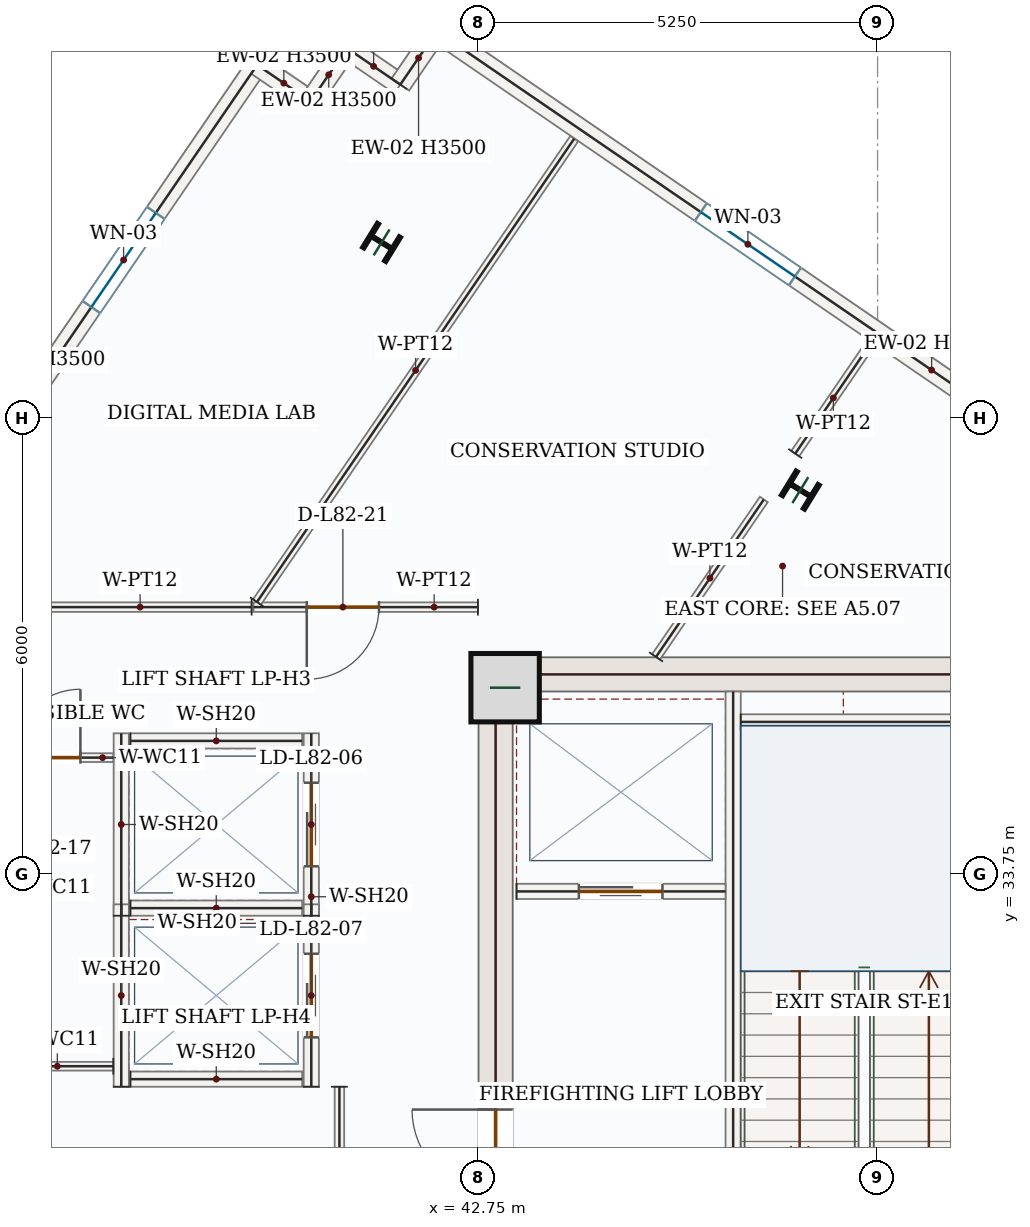
"""IFC4 building model, lengths in metres.
Left out: names, types, materials, properties, quantities, classifications, styles, units other than length and angle.
Written with IfcOpenShell. Run it as: python <this file> out.ifc"""

import sys

from ifc_helpers import new_model, si_unit, direction, frame, frame_2d, origin, origin_2d, place, context, subcontext, project, spatial, rectangle, i_section, extrude, source, transform, mapped, element, fill, save


model = new_model("IFC4")
c1 = context("Model", 3, precision=1e-05, world=origin(), true_north=direction((0.0, 1.0)))
c2 = subcontext(c1, "Body", "Model", "MODEL_VIEW")
j1 = project(units=[si_unit("LENGTHUNIT", "METRE"), si_unit("PLANEANGLEUNIT", "RADIAN")], contexts=[c1])
p1 = place(None, origin())
s1 = spatial("IfcSite", under=j1, at=p1, CompositionType="ELEMENT")
p2 = place(p1, origin())
s2 = spatial("IfcBuilding", under=s1, at=p2, CompositionType="ELEMENT")
p3 = place(p2, frame((0.0, 0.0, 338.55)))
s3 = spatial("IfcBuildingStorey", under=s2, at=p3, CompositionType="ELEMENT", Elevation=338.55)
p4 = place(p3, frame((42.975, 28.05, 0.0), z_axis=(0.0, 0.0, 1.0), x_axis=(0.0, 1.0, 0.0)))
e1 = element("IfcWall", 1, at=p4, inside=s3, PredefinedType="SHEAR", context=c2, shape_type="SweptSolid", body=[
    extrude(rectangle(XDim=8.55, YDim=0.45, at=frame_2d((4.275, 0.0))), origin(), (0.0, 0.0, 1.0), 3.5),
])
p5 = place(p4, frame((1.5, 0.0, 0.0)))
e2 = element("IfcOpeningElement", 2, at=p5, cuts=e1, PredefinedType="OPENING", context=c2, shape_type="SweptSolid", body=[
    extrude(rectangle(XDim=1.1, YDim=2.2, at=frame_2d((0.55, 1.1))), frame((0.0, 0.235, 0.0), z_axis=(0.0, -1.0, 0.0), x_axis=(1.0, 0.0, 0.0)), (0.0, 0.0, 1.0), 0.47),
])
m1 = source(origin(), c2, "Body", "SweptSolid", [
    extrude(rectangle(XDim=7.1, YDim=0.45, at=frame_2d((3.55, 0.0))), origin(), (0.0, 0.0, 1.0), 3.5),
])
p6 = place(p3, frame((43.2, 36.375, 0.0), z_axis=(0.0, 0.0, 1.0), x_axis=(1.0, 0.0, 0.0)))
e3 = element("IfcWall", 3, at=p6, inside=s3, PredefinedType="SHEAR", context=c2, shape_type="MappedRepresentation", body=[
    mapped(m1, transform((0.0, 0.0, 0.0), x_axis=(1.0, 0.0, 0.0), y_axis=(0.0, 1.0, 0.0), z_axis=(0.0, 0.0, 1.0), scale=1.0)),
])
m2 = source(origin(), c2, "Body", "SweptSolid", [
    extrude(rectangle(XDim=0.9, YDim=0.9, at=origin_2d()), origin(), (0.0, 0.0, 1.0), 3.75),
])
p7 = place(p3, frame((43.1, 36.2, 0.0), z_axis=(0.0, 0.0, 1.0), x_axis=(1.0, 0.0, 0.0)))
e4 = element("IfcColumn", 4, at=p7, inside=s3, PredefinedType="COLUMN", context=c2, shape_type="MappedRepresentation", body=[
    mapped(m2, transform((0.0, 0.0, 0.0), x_axis=(1.0, 0.0, 0.0), y_axis=(0.0, 1.0, 0.0), z_axis=(0.0, 0.0, 1.0), scale=1.0)),
])
m3 = source(origin(), c2, "Body", "SweptSolid", [
    extrude(i_section(OverallWidth=0.369, OverallDepth=0.356, WebThickness=0.011, FlangeThickness=0.018, FilletRadius=0.018, at=origin_2d()), origin(), (0.0, 0.0, 1.0), 3.75),
])
for number, where, z_axis, x_axis in (
    (5, (46.984, 38.8, 0.0), (0.0, 0.0, 1.0), (0.522, 0.853, 0.0)),
    (6, (41.475, 42.058, 0.0), (0.0, 0.0, 1.0), (0.522, 0.853, 0.0)),
):
    element("IfcColumn", number, at=place(p3, frame(where, z_axis=z_axis, x_axis=x_axis)), inside=s3, PredefinedType="COLUMN", context=c2, shape_type="MappedRepresentation", body=[
        mapped(m3, transform((0.0, 0.0, 0.0), x_axis=(1.0, 0.0, 0.0), y_axis=(0.0, 1.0, 0.0), z_axis=(0.0, 0.0, 1.0), scale=1.0)),
    ])
p8 = place(p3, frame((36.323, 39.26, 0.0), z_axis=(0.0, 0.0, 1.0), x_axis=(0.564953982519, 0.825122413728, 0.0)))
e7 = element("IfcWall", 7, at=p8, inside=s3, PredefinedType="SOLIDWALL", context=c2, shape_type="SweptSolid", body=[
    extrude(rectangle(XDim=6.221, YDim=0.28, at=frame_2d((3.111, 0.0))), origin(), (0.0, 0.0, 1.0), 3.5),
])
p9 = place(p8, frame((2.361, 0.0, 0.85)))
e8 = element("IfcOpeningElement", 8, at=p9, cuts=e7, PredefinedType="OPENING", context=c2, shape_type="SweptSolid", body=[
    extrude(rectangle(XDim=1.5, YDim=1.5, at=frame_2d((0.75, 0.75))), frame((0.0, 0.15, 0.0), z_axis=(0.0, -1.0, 0.0), x_axis=(1.0, 0.0, 0.0)), (0.0, 0.0, 1.0), 0.3),
])
m4 = source(origin(), c2, "Body", "SweptSolid", [
    extrude(rectangle(XDim=0.85, YDim=0.28, at=frame_2d((0.425, 0.0))), origin(), (0.0, 0.0, 1.0), 3.5),
])
for number, where, z_axis, x_axis in (
    (9, (39.838, 44.394, 0.0), (0.0, 0.0, 1.0), (0.825, -0.565, 0.0)),
    (10, (40.539, 43.913, 0.0), (0.0, 0.0, 1.0), (0.565, 0.825, 0.0)),
    (11, (41.02, 44.615, 0.0), (0.0, 0.0, 1.0), (0.825, -0.565, 0.0)),
):
    element("IfcWall", number, at=place(p3, frame(where, z_axis=z_axis, x_axis=x_axis)), inside=s3, PredefinedType="SOLIDWALL", context=c2, shape_type="MappedRepresentation", body=[
        mapped(m4, transform((0.0, 0.0, 0.0), x_axis=(1.0, 0.0, 0.0), y_axis=(0.0, 1.0, 0.0), z_axis=(0.0, 0.0, 1.0), scale=1.0)),
    ])
m5 = source(origin(), c2, "Body", "SweptSolid", [
    extrude(rectangle(XDim=0.85, YDim=0.28, at=frame_2d((0.425, 0.0))), origin(), (0.0, 0.0, 1.0), 3.5),
])
p10 = place(p3, frame((41.721, 44.135, 0.0), z_axis=(0.0, 0.0, 1.0), x_axis=(0.565064897913, 0.825046459993, 0.0)))
e12 = element("IfcWall", 12, at=p10, inside=s3, PredefinedType="SOLIDWALL", context=c2, shape_type="MappedRepresentation", body=[
    mapped(m5, transform((0.0, 0.0, 0.0), x_axis=(1.0, 0.0, 0.0), y_axis=(0.0, 1.0, 0.0), z_axis=(0.0, 0.0, 1.0), scale=1.0)),
])
p11 = place(p3, frame((42.201, 44.836, 0.0), z_axis=(0.0, 0.0, 1.0), x_axis=(0.825121888295, -0.56495474992, 0.0)))
e13 = element("IfcWall", 13, at=p11, inside=s3, PredefinedType="SOLIDWALL", context=c2, shape_type="SweptSolid", body=[
    extrude(rectangle(XDim=9.92, YDim=0.28, at=frame_2d((4.96, 0.0))), origin(), (0.0, 0.0, 1.0), 3.5),
])
p12 = place(p11, frame((4.21, 0.0, 0.85)))
e14 = element("IfcOpeningElement", 14, at=p12, cuts=e13, PredefinedType="OPENING", context=c2, shape_type="SweptSolid", body=[
    extrude(rectangle(XDim=1.5, YDim=1.5, at=frame_2d((0.75, 0.75))), frame((0.0, 0.15, 0.0), z_axis=(0.0, -1.0, 0.0), x_axis=(1.0, 0.0, 0.0)), (0.0, 0.0, 1.0), 0.3),
])
p13 = place(p3, frame((46.1, 28.15, 0.0), z_axis=(0.0, 0.0, 1.0), x_axis=(0.0, 1.0, 0.0)))
e15 = element("IfcWall", 15, at=p13, inside=s3, PredefinedType="SOLIDWALL", context=c2, shape_type="SweptSolid", body=[
    extrude(rectangle(XDim=8.0, YDim=0.2, at=frame_2d((4.0, 0.0))), origin(), (0.0, 0.0, 1.0), 3.5),
])
p14 = place(p13, frame((0.4, 0.0, 0.0)))
e16 = element("IfcOpeningElement", 16, at=p14, cuts=e15, PredefinedType="OPENING", context=c2, shape_type="SweptSolid", body=[
    extrude(rectangle(XDim=1.05, YDim=2.15, at=frame_2d((0.525, 1.075))), frame((0.0, 0.11, 0.0), z_axis=(0.0, -1.0, 0.0), x_axis=(1.0, 0.0, 0.0)), (0.0, 0.0, 1.0), 0.22),
])
m6 = source(origin(), c2, "Body", "SweptSolid", [
    extrude(rectangle(XDim=3.25, YDim=0.2, at=frame_2d((1.625, 0.0))), origin(), (0.0, 0.0, 1.0), 3.5),
])
p15 = place(p3, frame((46.2, 35.75, 0.0), z_axis=(0.0, 0.0, 1.0), x_axis=(1.0, 0.0, 0.0)))
e17 = element("IfcWall", 17, at=p15, inside=s3, PredefinedType="SOLIDWALL", context=c2, shape_type="MappedRepresentation", body=[
    mapped(m6, transform((0.0, 0.0, 0.0), x_axis=(1.0, 0.0, 0.0), y_axis=(0.0, 1.0, 0.0), z_axis=(0.0, 0.0, 1.0), scale=1.0)),
])
p16 = place(p3, frame((43.25, 33.52, 0.0), z_axis=(0.0, 0.0, 1.0), x_axis=(1.0, 0.0, 0.0)))
e18 = element("IfcWall", 18, at=p16, inside=s3, PredefinedType="SOLIDWALL", context=c2, shape_type="SweptSolid", body=[
    extrude(rectangle(XDim=2.75, YDim=0.2, at=frame_2d((1.375, 0.0))), origin(), (0.0, 0.0, 1.0), 3.5),
])
p17 = place(p16, frame((0.82, 0.0, 0.0)))
e19 = element("IfcOpeningElement", 19, at=p17, cuts=e18, PredefinedType="OPENING", context=c2, shape_type="SweptSolid", body=[
    extrude(rectangle(XDim=1.1, YDim=2.15, at=frame_2d((0.55, 1.075))), frame((0.0, 0.11, 0.0), z_axis=(0.0, -1.0, 0.0), x_axis=(1.0, 0.0, 0.0)), (0.0, 0.0, 1.0), 0.22),
])
m7 = source(origin(), c2, "Body", "SweptSolid", [
    extrude(rectangle(XDim=2.4, YDim=0.2, at=frame_2d((1.2, 0.0))), origin(), (0.0, 0.0, 1.0), 3.5),
])
p18 = place(p3, frame((38.05, 33.2, 0.0), z_axis=(0.0, 0.0, 1.0), x_axis=(0.0, 1.0, 0.0)))
e20 = element("IfcWall", 20, at=p18, inside=s3, PredefinedType="SOLIDWALL", context=c2, shape_type="MappedRepresentation", body=[
    mapped(m7, transform((0.0, 0.0, 0.0), x_axis=(1.0, 0.0, 0.0), y_axis=(0.0, 1.0, 0.0), z_axis=(0.0, 0.0, 1.0), scale=1.0)),
])
p19 = place(p3, frame((40.55, 33.2, 0.0), z_axis=(0.0, 0.0, 1.0), x_axis=(0.0, 1.0, 0.0)))
e21 = element("IfcWall", 21, at=p19, inside=s3, PredefinedType="SOLIDWALL", context=c2, shape_type="SweptSolid", body=[
    extrude(rectangle(XDim=2.4, YDim=0.2, at=frame_2d((1.2, 0.0))), origin(), (0.0, 0.0, 1.0), 3.5),
])
p20 = place(p19, frame((0.65, 0.0, 0.0)))
e22 = element("IfcOpeningElement", 22, at=p20, cuts=e21, PredefinedType="OPENING", context=c2, shape_type="SweptSolid", body=[
    extrude(rectangle(XDim=1.1, YDim=2.15, at=frame_2d((0.55, 1.075))), frame((0.0, 0.11, 0.0), z_axis=(0.0, -1.0, 0.0), x_axis=(1.0, 0.0, 0.0)), (0.0, 0.0, 1.0), 0.22),
])
m8 = source(origin(), c2, "Body", "SweptSolid", [
    extrude(rectangle(XDim=2.26, YDim=0.2, at=frame_2d((1.13, 0.0))), origin(), (0.0, 0.0, 1.0), 3.5),
])
for number, where, z_axis, x_axis in (
    (23, (38.17, 33.3, 0.0), (0.0, 0.0, 1.0), (1.0, 0.0, 0.0)),
    (24, (38.17, 35.5, 0.0), (0.0, 0.0, 1.0), (1.0, 0.0, 0.0)),
):
    element("IfcWall", number, at=place(p3, frame(where, z_axis=z_axis, x_axis=x_axis)), inside=s3, PredefinedType="SOLIDWALL", context=c2, shape_type="MappedRepresentation", body=[
        mapped(m8, transform((0.0, 0.0, 0.0), x_axis=(1.0, 0.0, 0.0), y_axis=(0.0, 1.0, 0.0), z_axis=(0.0, 0.0, 1.0), scale=1.0)),
    ])
p21 = place(p3, frame((38.05, 30.95, 0.0), z_axis=(0.0, 0.0, 1.0), x_axis=(0.0, 1.0, 0.0)))
e25 = element("IfcWall", 25, at=p21, inside=s3, PredefinedType="SOLIDWALL", context=c2, shape_type="MappedRepresentation", body=[
    mapped(m7, transform((0.0, 0.0, 0.0), x_axis=(1.0, 0.0, 0.0), y_axis=(0.0, 1.0, 0.0), z_axis=(0.0, 0.0, 1.0), scale=1.0)),
])
p22 = place(p3, frame((40.55, 30.95, 0.0), z_axis=(0.0, 0.0, 1.0), x_axis=(0.0, 1.0, 0.0)))
e26 = element("IfcWall", 26, at=p22, inside=s3, PredefinedType="SOLIDWALL", context=c2, shape_type="SweptSolid", body=[
    extrude(rectangle(XDim=2.4, YDim=0.2, at=frame_2d((1.2, 0.0))), origin(), (0.0, 0.0, 1.0), 3.5),
])
p23 = place(p22, frame((0.65, 0.0, 0.0)))
e27 = element("IfcOpeningElement", 27, at=p23, cuts=e26, PredefinedType="OPENING", context=c2, shape_type="SweptSolid", body=[
    extrude(rectangle(XDim=1.1, YDim=2.15, at=frame_2d((0.55, 1.075))), frame((0.0, 0.11, 0.0), z_axis=(0.0, -1.0, 0.0), x_axis=(1.0, 0.0, 0.0)), (0.0, 0.0, 1.0), 0.22),
])
p24 = place(p3, frame((38.17, 31.05, 0.0), z_axis=(0.0, 0.0, 1.0), x_axis=(1.0, 0.0, 0.0)))
e28 = element("IfcWall", 28, at=p24, inside=s3, PredefinedType="SOLIDWALL", context=c2, shape_type="MappedRepresentation", body=[
    mapped(m8, transform((0.0, 0.0, 0.0), x_axis=(1.0, 0.0, 0.0), y_axis=(0.0, 1.0, 0.0), z_axis=(0.0, 0.0, 1.0), scale=1.0)),
])
m9 = source(origin(), c2, "Body", "SweptSolid", [
    extrude(rectangle(XDim=1.473, YDim=0.115, at=frame_2d((0.736, 0.0))), origin(), (0.0, 0.0, 1.0), 3.5),
])
p25 = place(p3, frame((37.945, 31.22, 0.0), z_axis=(0.0, 0.0, 1.0), x_axis=(-1.0, 0.0, 0.0)))
e29 = element("IfcWall", 29, at=p25, inside=s3, PredefinedType="PARTITIONING", context=c2, shape_type="MappedRepresentation", body=[
    mapped(m9, transform((0.0, 0.0, 0.0), x_axis=(1.0, 0.0, 0.0), y_axis=(0.0, 1.0, 0.0), z_axis=(0.0, 0.0, 1.0), scale=1.0)),
])
p26 = place(p3, frame((36.472, 35.28, 0.0), z_axis=(0.0, 0.0, 1.0), x_axis=(1.0, 0.0, 0.0)))
e30 = element("IfcWall", 30, at=p26, inside=s3, PredefinedType="PARTITIONING", context=c2, shape_type="SweptSolid", body=[
    extrude(rectangle(XDim=1.473, YDim=0.115, at=frame_2d((0.736, 0.0))), origin(), (0.0, 0.0, 1.0), 3.5),
])
p27 = place(p26, frame((0.14, 0.0, 0.0)))
e31 = element("IfcOpeningElement", 31, at=p27, cuts=e30, PredefinedType="OPENING", context=c2, shape_type="SweptSolid", body=[
    extrude(rectangle(XDim=0.9, YDim=2.1, at=frame_2d((0.45, 1.05))), frame((0.0, 0.067, 0.0), z_axis=(0.0, -1.0, 0.0), x_axis=(1.0, 0.0, 0.0)), (0.0, 0.0, 1.0), 0.135),
])
m10 = source(origin(), c2, "Body", "SweptSolid", [
    extrude(rectangle(XDim=3.01, YDim=0.125, at=frame_2d((1.505, 0.0))), origin(), (0.0, 0.0, 1.0), 3.5),
])
p28 = place(p3, frame((40.92, 30.95, 0.0), z_axis=(0.0, 0.0, 1.0), x_axis=(0.0, -1.0, 0.0)))
e32 = element("IfcWall", 32, at=p28, inside=s3, PredefinedType="PARTITIONING", context=c2, shape_type="MappedRepresentation", body=[
    mapped(m10, transform((0.0, 0.0, 0.0), x_axis=(1.0, 0.0, 0.0), y_axis=(0.0, 1.0, 0.0), z_axis=(0.0, 0.0, 1.0), scale=1.0)),
])
m11 = source(origin(), c2, "Body", "SweptSolid", [
    extrude(rectangle(XDim=2.511, YDim=0.125, at=frame_2d((1.255, 0.0))), origin(), (0.0, 0.0, 1.0), 3.5),
])
p29 = place(p3, frame((45.085, 36.605, 0.0), z_axis=(0.0, 0.0, 1.0), x_axis=(0.564980194272, 0.825104466162, 0.0)))
e33 = element("IfcWall", 33, at=p29, inside=s3, PredefinedType="PARTITIONING", context=c2, shape_type="MappedRepresentation", body=[
    mapped(m11, transform((0.0, 0.0, 0.0), x_axis=(1.0, 0.0, 0.0), y_axis=(0.0, 1.0, 0.0), z_axis=(0.0, 0.0, 1.0), scale=1.0)),
])
m12 = source(origin(), c2, "Body", "SweptSolid", [
    extrude(rectangle(XDim=1.775, YDim=0.125, at=frame_2d((0.888, 0.0))), origin(), (0.0, 0.0, 1.0), 3.5),
])
p30 = place(p3, frame((46.917, 39.28, 0.0), z_axis=(0.0, 0.0, 1.0), x_axis=(0.56509798207, 0.825023800057, 0.0)))
e34 = element("IfcWall", 34, at=p30, inside=s3, PredefinedType="PARTITIONING", context=c2, shape_type="MappedRepresentation", body=[
    mapped(m12, transform((0.0, 0.0, 0.0), x_axis=(1.0, 0.0, 0.0), y_axis=(0.0, 1.0, 0.0), z_axis=(0.0, 0.0, 1.0), scale=1.0)),
])
p31 = place(p3, frame((42.742, 37.26, 0.0), z_axis=(0.0, 0.0, 1.0), x_axis=(-0.999999996583, 8.2671957e-05, 0.0)))
e35 = element("IfcWall", 35, at=p31, inside=s3, PredefinedType="PARTITIONING", context=c2, shape_type="SweptSolid", body=[
    extrude(rectangle(XDim=2.953, YDim=0.125, at=frame_2d((1.477, 0.0))), origin(), (0.0, 0.0, 1.0), 3.5),
])
p32 = place(p31, frame((1.302, 0.0, 0.0)))
e36 = element("IfcOpeningElement", 36, at=p32, cuts=e35, PredefinedType="OPENING", context=c2, shape_type="SweptSolid", body=[
    extrude(rectangle(XDim=0.95, YDim=2.15, at=frame_2d((0.475, 1.075))), frame((0.0, 0.073, 0.0), z_axis=(0.0, -1.0, 0.0), x_axis=(1.0, 0.0, 0.0)), (0.0, 0.0, 1.0), 0.145),
])
m13 = source(origin(), c2, "Body", "SweptSolid", [
    extrude(rectangle(XDim=7.387, YDim=0.125, at=frame_2d((3.693, 0.0))), origin(), (0.0, 0.0, 1.0), 3.5),
])
p33 = place(p3, frame((39.835, 37.327, 0.0), z_axis=(0.0, 0.0, 1.0), x_axis=(0.564969427755, 0.8251118383, 0.0)))
e37 = element("IfcWall", 37, at=p33, inside=s3, PredefinedType="PARTITIONING", context=c2, shape_type="MappedRepresentation", body=[
    mapped(m13, transform((0.0, 0.0, 0.0), x_axis=(1.0, 0.0, 0.0), y_axis=(0.0, 1.0, 0.0), z_axis=(0.0, 0.0, 1.0), scale=1.0)),
])
p34 = place(p3, frame((39.765, 37.26, 0.0), z_axis=(0.0, 0.0, 1.0), x_axis=(-1.0, 0.0, 0.0)))
e38 = element("IfcWall", 38, at=p34, inside=s3, PredefinedType="PARTITIONING", context=c2, shape_type="SweptSolid", body=[
    extrude(rectangle(XDim=5.696, YDim=0.125, at=frame_2d((2.848, 0.0))), origin(), (0.0, 0.0, 1.0), 3.5),
])
p35 = place(p34, frame((3.085, 0.0, 0.0)))
e39 = element("IfcOpeningElement", 39, at=p35, cuts=e38, PredefinedType="OPENING", context=c2, shape_type="SweptSolid", body=[
    extrude(rectangle(XDim=0.95, YDim=2.15, at=frame_2d((0.475, 1.075))), frame((0.0, 0.073, 0.0), z_axis=(0.0, -1.0, 0.0), x_axis=(1.0, 0.0, 0.0)), (0.0, 0.0, 1.0), 0.145),
])
m14 = source(origin(), c2, "Body", "SweptSolid", [
    extrude(rectangle(XDim=1.5, YDim=1.5, at=frame_2d((0.75, 0.75))), frame((0.0, 0.03, 0.0), z_axis=(0.0, -1.0, 0.0), x_axis=(1.0, 0.0, 0.0)), (0.0, 0.0, 1.0), 0.06),
])
p36 = place(p9, origin())
e40 = element("IfcWindow", 40, at=p36, inside=s3, PartitioningType="SINGLE_PANEL", PredefinedType="WINDOW", context=c2, shape_type="MappedRepresentation", body=[
    mapped(m14, transform((0.0, 0.0, 0.0), x_axis=(1.0, 0.0, 0.0), y_axis=(0.0, 1.0, 0.0), z_axis=(0.0, 0.0, 1.0), scale=1.0)),
])
fill(e8, e40)
p37 = place(p12, origin())
e41 = element("IfcWindow", 41, at=p37, inside=s3, PartitioningType="SINGLE_PANEL", PredefinedType="WINDOW", context=c2, shape_type="MappedRepresentation", body=[
    mapped(m14, transform((0.0, 0.0, 0.0), x_axis=(1.0, 0.0, 0.0), y_axis=(0.0, 1.0, 0.0), z_axis=(0.0, 0.0, 1.0), scale=1.0)),
])
fill(e14, e41)
m15 = source(origin(), c2, "Body", "SweptSolid", [
    extrude(rectangle(XDim=1.1, YDim=2.15, at=frame_2d((0.55, 1.075))), frame((0.0, 0.025, 0.0), z_axis=(0.0, -1.0, 0.0), x_axis=(1.0, 0.0, 0.0)), (0.0, 0.0, 1.0), 0.05),
])
p38 = place(p17, origin())
e42 = element("IfcDoor", 42, at=p38, inside=s3, OperationType="DOUBLE_DOOR_SLIDING", PredefinedType="DOOR", context=c2, shape_type="MappedRepresentation", body=[
    mapped(m15, transform((0.0, 0.0, 0.0), x_axis=(1.0, 0.0, 0.0), y_axis=(0.0, 1.0, 0.0), z_axis=(0.0, 0.0, 1.0), scale=1.0)),
])
fill(e19, e42)
m16 = source(origin(), c2, "Body", "SweptSolid", [
    extrude(rectangle(XDim=1.1, YDim=2.2, at=frame_2d((0.55, 1.1))), frame((0.0, 0.025, 0.0), z_axis=(0.0, -1.0, 0.0), x_axis=(1.0, 0.0, 0.0)), (0.0, 0.0, 1.0), 0.05),
])
p39 = place(p5, origin())
e43 = element("IfcDoor", 43, at=p39, inside=s3, OperationType="SINGLE_SWING_RIGHT", PredefinedType="DOOR", context=c2, shape_type="MappedRepresentation", body=[
    mapped(m16, transform((0.0, 0.0, 0.0), x_axis=(1.0, 0.0, 0.0), y_axis=(0.0, 1.0, 0.0), z_axis=(0.0, 0.0, 1.0), scale=1.0)),
])
fill(e2, e43)
p40 = place(p20, origin())
e44 = element("IfcDoor", 44, at=p40, inside=s3, OperationType="DOUBLE_DOOR_SLIDING", PredefinedType="DOOR", context=c2, shape_type="MappedRepresentation", body=[
    mapped(m15, transform((0.0, 0.0, 0.0), x_axis=(1.0, 0.0, 0.0), y_axis=(0.0, 1.0, 0.0), z_axis=(0.0, 0.0, 1.0), scale=1.0)),
])
fill(e22, e44)
p41 = place(p23, origin())
e45 = element("IfcDoor", 45, at=p41, inside=s3, OperationType="DOUBLE_DOOR_SLIDING", PredefinedType="DOOR", context=c2, shape_type="MappedRepresentation", body=[
    mapped(m15, transform((0.0, 0.0, 0.0), x_axis=(1.0, 0.0, 0.0), y_axis=(0.0, 1.0, 0.0), z_axis=(0.0, 0.0, 1.0), scale=1.0)),
])
fill(e27, e45)
m17 = source(origin(), c2, "Body", "SweptSolid", [
    extrude(rectangle(XDim=0.9, YDim=2.1, at=frame_2d((0.45, 1.05))), frame((0.0, 0.025, 0.0), z_axis=(0.0, -1.0, 0.0), x_axis=(1.0, 0.0, 0.0)), (0.0, 0.0, 1.0), 0.05),
])
p42 = place(p27, origin())
e46 = element("IfcDoor", 46, at=p42, inside=s3, OperationType="SINGLE_SWING_RIGHT", PredefinedType="DOOR", context=c2, shape_type="MappedRepresentation", body=[
    mapped(m17, transform((0.0, 0.0, 0.0), x_axis=(1.0, 0.0, 0.0), y_axis=(0.0, 1.0, 0.0), z_axis=(0.0, 0.0, 1.0), scale=1.0)),
])
fill(e31, e46)
m18 = source(origin(), c2, "Body", "SweptSolid", [
    extrude(rectangle(XDim=0.95, YDim=2.15, at=frame_2d((0.475, 1.075))), frame((0.0, 0.025, 0.0), z_axis=(0.0, -1.0, 0.0), x_axis=(1.0, 0.0, 0.0)), (0.0, 0.0, 1.0), 0.05),
])
p43 = place(p32, origin())
e47 = element("IfcDoor", 47, at=p43, inside=s3, OperationType="SINGLE_SWING_RIGHT", PredefinedType="DOOR", context=c2, shape_type="MappedRepresentation", body=[
    mapped(m18, transform((0.0, 0.0, 0.0), x_axis=(1.0, 0.0, 0.0), y_axis=(0.0, 1.0, 0.0), z_axis=(0.0, 0.0, 1.0), scale=1.0)),
])
fill(e36, e47)
save(model, sys.argv[1])
